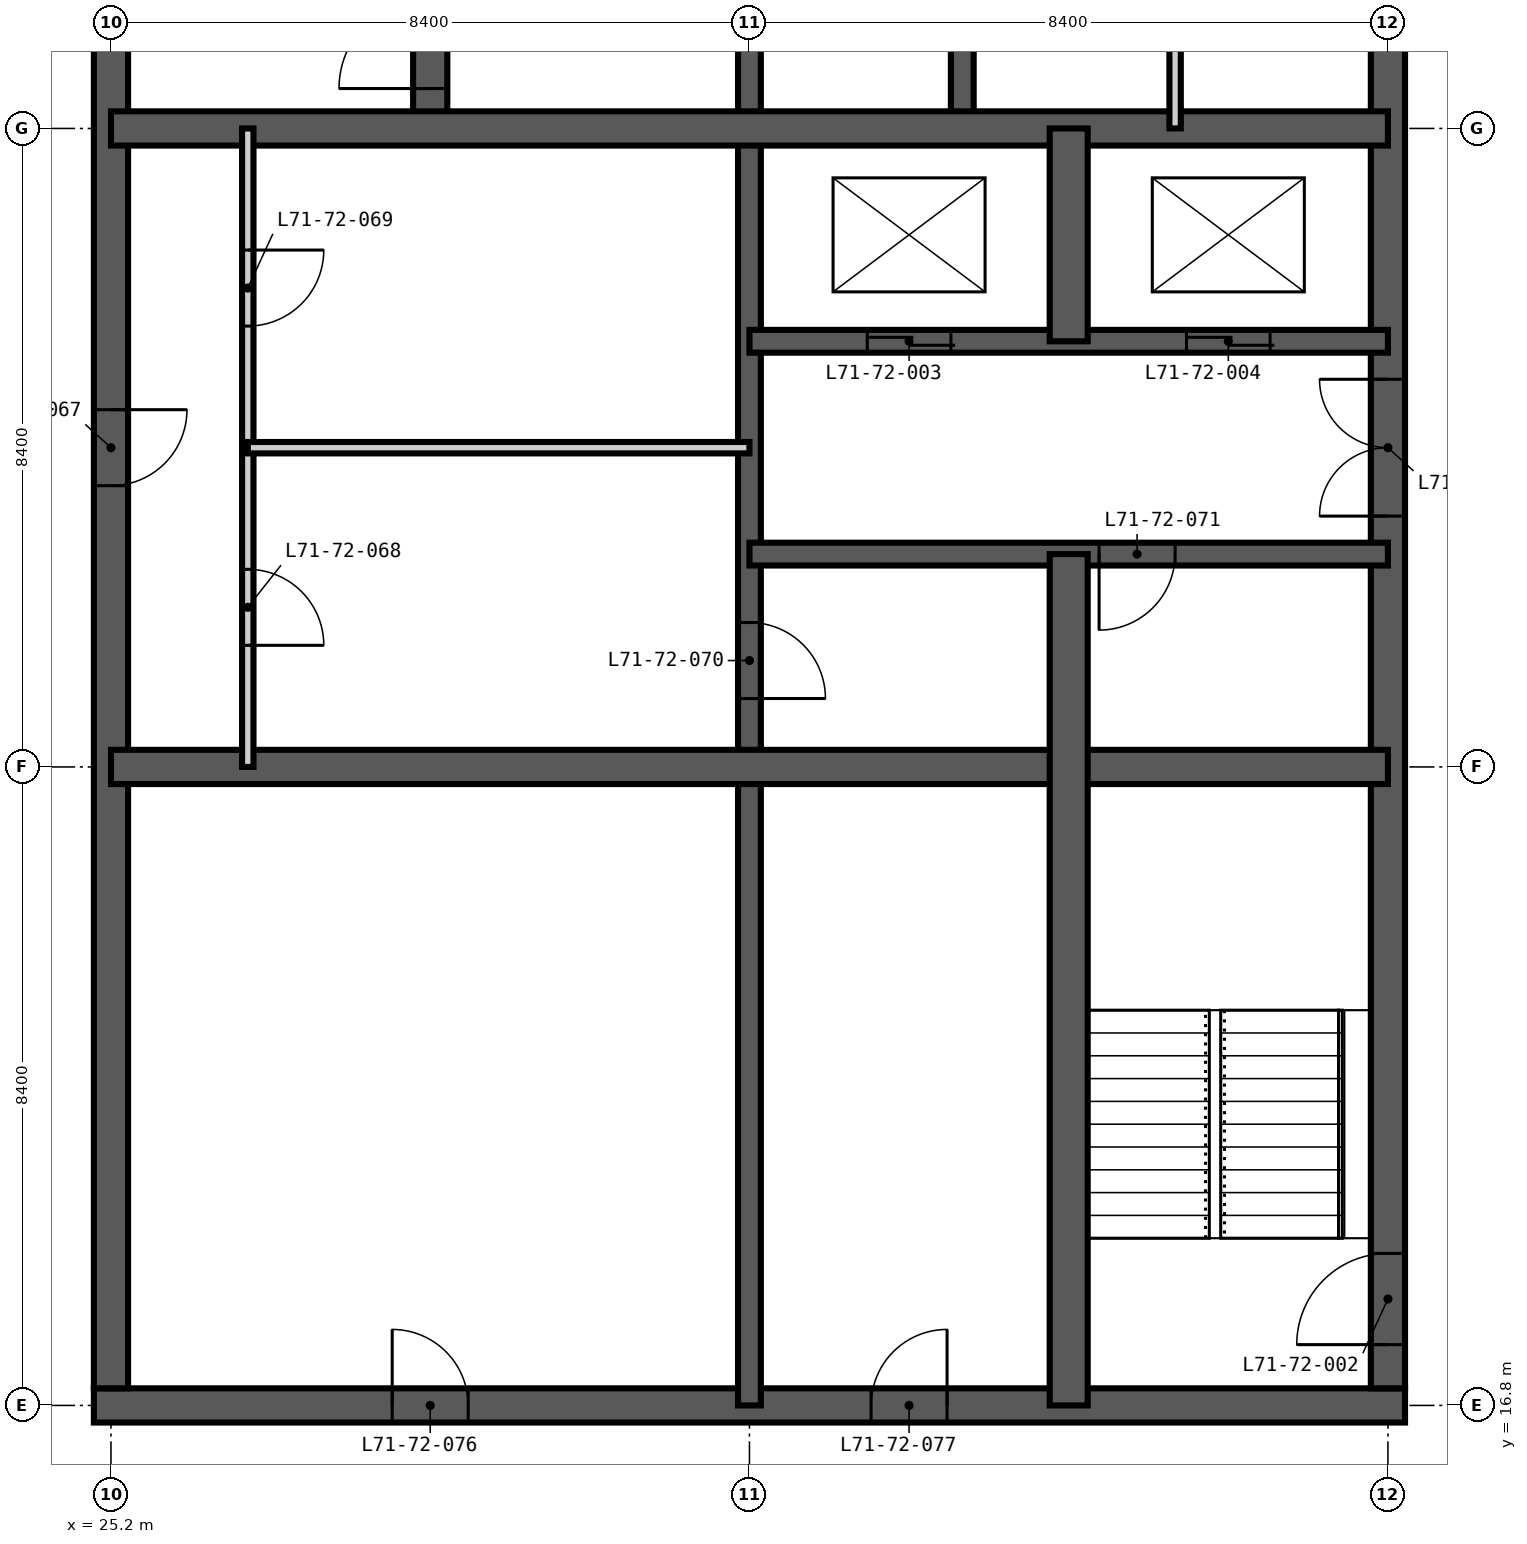
"""IFC4 building model, lengths in metres.
Left out: names, types, materials, properties, quantities, classifications, styles, units other than length and angle.
Written with IfcOpenShell. Run it as: python <this file> out.ifc"""

import sys

from ifc_helpers import new_model, si_unit, direction, frame, frame_2d, origin, place, context, subcontext, project, spatial, rectangle, extrude, element, fill, save


model = new_model("IFC4")
c1 = context("Model", 3, precision=1e-05, world=origin(), true_north=direction((0.0, 1.0)))
c2 = subcontext(c1, "Body", "Model", "MODEL_VIEW")
j1 = project(units=[si_unit("LENGTHUNIT", "METRE"), si_unit("PLANEANGLEUNIT", "RADIAN")], contexts=[c1])
p1 = place(None, origin())
s1 = spatial("IfcSite", under=j1, at=p1, CompositionType="ELEMENT")
p2 = place(p1, origin())
s2 = spatial("IfcBuilding", under=s1, at=p2, CompositionType="ELEMENT")
p3 = place(p2, frame((0.0, 0.0, 276.3)))
s3 = spatial("IfcBuildingStorey", under=s2, at=p3, CompositionType="ELEMENT", Elevation=276.3)
p4 = place(p3, frame((24.975, 16.8, -0.35), z_axis=(0.0, 0.0, 1.0), x_axis=(1.0, 0.0, 0.0)))
e1 = element("IfcWall", 1, at=p4, inside=s3, PredefinedType="SHEAR", context=c2, shape_type="SweptSolid", body=[
    extrude(rectangle(XDim=17.25, YDim=0.45, at=frame_2d((8.625, 0.0))), origin(), (0.0, 0.0, 1.0), 3.9),
])
p5 = place(p4, frame((3.925, 0.0, 0.35)))
e2 = element("IfcOpeningElement", 2, at=p5, cuts=e1, PredefinedType="OPENING", context=c2, shape_type="SweptSolid", body=[
    extrude(rectangle(XDim=1.0, YDim=2.1, at=frame_2d((0.5, 1.05))), frame((0.0, 0.235, 0.0), z_axis=(0.0, -1.0, 0.0), x_axis=(1.0, 0.0, 0.0)), (0.0, 0.0, 1.0), 0.47),
])
p6 = place(p4, frame((10.225, 0.0, 0.35)))
e3 = element("IfcOpeningElement", 3, at=p6, cuts=e1, PredefinedType="OPENING", context=c2, shape_type="SweptSolid", body=[
    extrude(rectangle(XDim=1.0, YDim=2.1, at=frame_2d((0.5, 1.05))), frame((0.0, 0.235, 0.0), z_axis=(0.0, -1.0, 0.0), x_axis=(1.0, 0.0, 0.0)), (0.0, 0.0, 1.0), 0.47),
])
p7 = place(p3, frame((42.0, 17.025, -0.35), z_axis=(0.0, 0.0, 1.0), x_axis=(0.0, 1.0, 0.0)))
e4 = element("IfcWall", 4, at=p7, inside=s3, PredefinedType="SHEAR", context=c2, shape_type="SweptSolid", body=[
    extrude(rectangle(XDim=24.75, YDim=0.45, at=frame_2d((12.375, 0.0))), origin(), (0.0, 0.0, 1.0), 3.9),
])
p8 = place(p7, frame((0.575, 0.0, 0.35)))
e5 = element("IfcOpeningElement", 5, at=p8, cuts=e4, PredefinedType="OPENING", context=c2, shape_type="SweptSolid", body=[
    extrude(rectangle(XDim=1.2, YDim=2.2, at=frame_2d((0.6, 1.1))), frame((0.0, 0.235, 0.0), z_axis=(0.0, -1.0, 0.0), x_axis=(1.0, 0.0, 0.0)), (0.0, 0.0, 1.0), 0.47),
])
p9 = place(p7, frame((11.475, 0.0, 0.35)))
e6 = element("IfcOpeningElement", 6, at=p9, cuts=e4, PredefinedType="OPENING", context=c2, shape_type="SweptSolid", body=[
    extrude(rectangle(XDim=1.8, YDim=2.2, at=frame_2d((0.9, 1.1))), frame((0.0, 0.235, 0.0), z_axis=(0.0, -1.0, 0.0), x_axis=(1.0, 0.0, 0.0)), (0.0, 0.0, 1.0), 0.47),
])
p10 = place(p7, frame((20.275, 0.0, 0.35)))
e7 = element("IfcOpeningElement", 7, at=p10, cuts=e4, PredefinedType="OPENING", context=c2, shape_type="SweptSolid", body=[
    extrude(rectangle(XDim=1.0, YDim=2.1, at=frame_2d((0.5, 1.05))), frame((0.0, 0.235, 0.0), z_axis=(0.0, -1.0, 0.0), x_axis=(1.0, 0.0, 0.0)), (0.0, 0.0, 1.0), 0.47),
])
p11 = place(p3, frame((25.2, 41.775, -0.35), z_axis=(0.0, 0.0, 1.0), x_axis=(0.0, -1.0, 0.0)))
e8 = element("IfcWall", 8, at=p11, inside=s3, PredefinedType="SHEAR", context=c2, shape_type="SweptSolid", body=[
    extrude(rectangle(XDim=24.75, YDim=0.45, at=frame_2d((12.375, 0.0))), origin(), (0.0, 0.0, 1.0), 3.9),
])
p12 = place(p11, frame((11.875, 0.0, 0.35)))
e9 = element("IfcOpeningElement", 9, at=p12, cuts=e8, PredefinedType="OPENING", context=c2, shape_type="SweptSolid", body=[
    extrude(rectangle(XDim=1.0, YDim=2.1, at=frame_2d((0.5, 1.05))), frame((0.0, 0.235, 0.0), z_axis=(0.0, -1.0, 0.0), x_axis=(1.0, 0.0, 0.0)), (0.0, 0.0, 1.0), 0.47),
])
p13 = place(p3, frame((33.6, 16.8, -0.35), z_axis=(0.0, 0.0, 1.0), x_axis=(0.0, 1.0, 0.0)))
e10 = element("IfcWall", 10, at=p13, inside=s3, PredefinedType="SHEAR", context=c2, shape_type="SweptSolid", body=[
    extrude(rectangle(XDim=25.2, YDim=0.3, at=frame_2d((12.6, 0.0))), origin(), (0.0, 0.0, 1.0), 3.9),
])
p14 = place(p13, frame((22.5, 0.0, 0.35)))
e11 = element("IfcOpeningElement", 11, at=p14, cuts=e10, PredefinedType="OPENING", context=c2, shape_type="SweptSolid", body=[
    extrude(rectangle(XDim=1.2, YDim=2.2, at=frame_2d((0.6, 1.1))), frame((0.0, 0.16, 0.0), z_axis=(0.0, -1.0, 0.0), x_axis=(1.0, 0.0, 0.0)), (0.0, 0.0, 1.0), 0.32),
])
p15 = place(p13, frame((18.3, 0.0, 0.35)))
e12 = element("IfcOpeningElement", 12, at=p15, cuts=e10, PredefinedType="OPENING", context=c2, shape_type="SweptSolid", body=[
    extrude(rectangle(XDim=1.2, YDim=2.2, at=frame_2d((0.6, 1.1))), frame((0.0, 0.16, 0.0), z_axis=(0.0, -1.0, 0.0), x_axis=(1.0, 0.0, 0.0)), (0.0, 0.0, 1.0), 0.32),
])
p16 = place(p13, frame((9.3, 0.0, 0.35)))
e13 = element("IfcOpeningElement", 13, at=p16, cuts=e10, PredefinedType="OPENING", context=c2, shape_type="SweptSolid", body=[
    extrude(rectangle(XDim=1.0, YDim=2.1, at=frame_2d((0.5, 1.05))), frame((0.0, 0.16, 0.0), z_axis=(0.0, -1.0, 0.0), x_axis=(1.0, 0.0, 0.0)), (0.0, 0.0, 1.0), 0.32),
])
p17 = place(p3, frame((36.4, 33.6, -0.35), z_axis=(0.0, 0.0, 1.0), x_axis=(0.0, 1.0, 0.0)))
e14 = element("IfcWall", 14, at=p17, inside=s3, PredefinedType="SHEAR", context=c2, shape_type="SweptSolid", body=[
    extrude(rectangle(XDim=8.4, YDim=0.3, at=frame_2d((4.2, 0.0))), origin(), (0.0, 0.0, 1.0), 3.9),
])
p18 = place(p3, frame((33.6, 28.0, -0.35), z_axis=(0.0, 0.0, 1.0), x_axis=(1.0, 0.0, 0.0)))
e15 = element("IfcWall", 15, at=p18, inside=s3, PredefinedType="SHEAR", context=c2, shape_type="SweptSolid", body=[
    extrude(rectangle(XDim=8.4, YDim=0.3, at=frame_2d((4.2, 0.0))), origin(), (0.0, 0.0, 1.0), 3.9),
])
p19 = place(p18, frame((4.6, 0.0, 0.35)))
e16 = element("IfcOpeningElement", 16, at=p19, cuts=e15, PredefinedType="OPENING", context=c2, shape_type="SweptSolid", body=[
    extrude(rectangle(XDim=1.0, YDim=2.1, at=frame_2d((0.5, 1.05))), frame((0.0, 0.16, 0.0), z_axis=(0.0, -1.0, 0.0), x_axis=(1.0, 0.0, 0.0)), (0.0, 0.0, 1.0), 0.32),
])
p20 = place(p3, frame((33.6, 30.8, -0.35), z_axis=(0.0, 0.0, 1.0), x_axis=(1.0, 0.0, 0.0)))
e17 = element("IfcWall", 17, at=p20, inside=s3, PredefinedType="SHEAR", context=c2, shape_type="SweptSolid", body=[
    extrude(rectangle(XDim=8.4, YDim=0.3, at=frame_2d((4.2, 0.0))), origin(), (0.0, 0.0, 1.0), 3.9),
])
p21 = place(p20, frame((1.55, 0.0, 0.35)))
e18 = element("IfcOpeningElement", 18, at=p21, cuts=e17, PredefinedType="OPENING", context=c2, shape_type="SweptSolid", body=[
    extrude(rectangle(XDim=1.1, YDim=2.2, at=frame_2d((0.55, 1.1))), frame((0.0, 0.16, 0.0), z_axis=(0.0, -1.0, 0.0), x_axis=(1.0, 0.0, 0.0)), (0.0, 0.0, 1.0), 0.32),
])
p22 = place(p20, frame((5.75, 0.0, 0.35)))
e19 = element("IfcOpeningElement", 19, at=p22, cuts=e17, PredefinedType="OPENING", context=c2, shape_type="SweptSolid", body=[
    extrude(rectangle(XDim=1.1, YDim=2.2, at=frame_2d((0.55, 1.1))), frame((0.0, 0.16, 0.0), z_axis=(0.0, -1.0, 0.0), x_axis=(1.0, 0.0, 0.0)), (0.0, 0.0, 1.0), 0.32),
])
p23 = place(p3, frame((29.4, 33.6, -0.35), z_axis=(0.0, 0.0, 1.0), x_axis=(0.0, 1.0, 0.0)))
e20 = element("IfcWall", 20, at=p23, inside=s3, PredefinedType="SHEAR", context=c2, shape_type="SweptSolid", body=[
    extrude(rectangle(XDim=8.4, YDim=0.45, at=frame_2d((4.2, 0.0))), origin(), (0.0, 0.0, 1.0), 3.9),
])
p24 = place(p23, frame((0.525, 0.0, 0.35)))
e21 = element("IfcOpeningElement", 21, at=p24, cuts=e20, PredefinedType="OPENING", context=c2, shape_type="SweptSolid", body=[
    extrude(rectangle(XDim=1.2, YDim=2.2, at=frame_2d((0.6, 1.1))), frame((0.0, 0.235, 0.0), z_axis=(0.0, -1.0, 0.0), x_axis=(1.0, 0.0, 0.0)), (0.0, 0.0, 1.0), 0.47),
])
for number, where, z_axis, x_axis in (
    (22, (25.2, 25.2, -0.35), (0.0, 0.0, 1.0), (1.0, 0.0, 0.0)),
    (23, (25.2, 33.6, -0.35), (0.0, 0.0, 1.0), (1.0, 0.0, 0.0)),
):
    element("IfcWall", number, at=place(p3, frame(where, z_axis=z_axis, x_axis=x_axis)), inside=s3, PredefinedType="SHEAR", context=c2, shape_type="SweptSolid", body=[
        extrude(rectangle(XDim=16.8, YDim=0.45, at=frame_2d((8.4, 0.0))), origin(), (0.0, 0.0, 1.0), 3.9),
    ])
p25 = place(p3, frame((37.8, 16.8, -0.35), z_axis=(0.0, 0.0, 1.0), x_axis=(0.0, 1.0, 0.0)))
e24 = element("IfcWall", 24, at=p25, inside=s3, PredefinedType="SHEAR", context=c2, shape_type="SweptSolid", body=[
    extrude(rectangle(XDim=11.2, YDim=0.5, at=frame_2d((5.6, 0.0))), origin(), (0.0, 0.0, 1.0), 3.9),
])
p26 = place(p3, frame((37.8, 30.8, -0.35), z_axis=(0.0, 0.0, 1.0), x_axis=(0.0, 1.0, 0.0)))
e25 = element("IfcWall", 25, at=p26, inside=s3, PredefinedType="SHEAR", context=c2, shape_type="SweptSolid", body=[
    extrude(rectangle(XDim=2.8, YDim=0.5, at=frame_2d((1.4, 0.0))), origin(), (0.0, 0.0, 1.0), 3.9),
])
p27 = place(p3, frame((27.0, 25.2, 0.0), z_axis=(0.0, 0.0, 1.0), x_axis=(0.0, 1.0, 0.0)))
e26 = element("IfcWall", 26, at=p27, inside=s3, PredefinedType="PARTITIONING", context=c2, shape_type="SweptSolid", body=[
    extrude(rectangle(XDim=8.4, YDim=0.15, at=frame_2d((4.2, 0.0))), origin(), (0.0, 0.0, 1.0), 3.55),
])
p28 = place(p27, frame((1.6, 0.0, 0.0)))
e27 = element("IfcOpeningElement", 27, at=p28, cuts=e26, PredefinedType="OPENING", context=c2, shape_type="SweptSolid", body=[
    extrude(rectangle(XDim=1.0, YDim=2.1, at=frame_2d((0.5, 1.05))), frame((0.0, 0.085, 0.0), z_axis=(0.0, -1.0, 0.0), x_axis=(1.0, 0.0, 0.0)), (0.0, 0.0, 1.0), 0.17),
])
p29 = place(p27, frame((5.8, 0.0, 0.0)))
e28 = element("IfcOpeningElement", 28, at=p29, cuts=e26, PredefinedType="OPENING", context=c2, shape_type="SweptSolid", body=[
    extrude(rectangle(XDim=1.0, YDim=2.1, at=frame_2d((0.5, 1.05))), frame((0.0, 0.085, 0.0), z_axis=(0.0, -1.0, 0.0), x_axis=(1.0, 0.0, 0.0)), (0.0, 0.0, 1.0), 0.17),
])
p30 = place(p3, frame((39.2, 33.6, 0.0), z_axis=(0.0, 0.0, 1.0), x_axis=(0.0, 1.0, 0.0)))
e29 = element("IfcWall", 29, at=p30, inside=s3, PredefinedType="PARTITIONING", context=c2, shape_type="SweptSolid", body=[
    extrude(rectangle(XDim=8.4, YDim=0.15, at=frame_2d((4.2, 0.0))), origin(), (0.0, 0.0, 1.0), 3.55),
])
p31 = place(p30, frame((3.7, 0.0, 0.0)))
e30 = element("IfcOpeningElement", 30, at=p31, cuts=e29, PredefinedType="OPENING", context=c2, shape_type="SweptSolid", body=[
    extrude(rectangle(XDim=1.0, YDim=2.1, at=frame_2d((0.5, 1.05))), frame((0.0, 0.085, 0.0), z_axis=(0.0, -1.0, 0.0), x_axis=(1.0, 0.0, 0.0)), (0.0, 0.0, 1.0), 0.17),
])
p32 = place(p3, frame((27.0, 29.4, 0.0), z_axis=(0.0, 0.0, 1.0), x_axis=(1.0, 0.0, 0.0)))
e31 = element("IfcWall", 31, at=p32, inside=s3, PredefinedType="PARTITIONING", context=c2, shape_type="SweptSolid", body=[
    extrude(rectangle(XDim=6.6, YDim=0.15, at=frame_2d((3.3, 0.0))), origin(), (0.0, 0.0, 1.0), 3.55),
])
p33 = place(p24, origin())
e32 = element("IfcDoor", 32, at=p33, inside=s3, OperationType="SINGLE_SWING_LEFT", PredefinedType="DOOR", context=c2, shape_type="SweptSolid", body=[
    extrude(rectangle(XDim=1.2, YDim=2.2, at=frame_2d((0.6, 1.1))), frame((0.0, 0.025, 0.0), z_axis=(0.0, -1.0, 0.0), x_axis=(1.0, 0.0, 0.0)), (0.0, 0.0, 1.0), 0.05),
])
fill(e21, e32)
p34 = place(p8, origin())
e33 = element("IfcDoor", 33, at=p34, inside=s3, OperationType="SINGLE_SWING_LEFT", PredefinedType="DOOR", context=c2, shape_type="SweptSolid", body=[
    extrude(rectangle(XDim=1.2, YDim=2.2, at=frame_2d((0.6, 1.1))), frame((0.0, 0.025, 0.0), z_axis=(0.0, -1.0, 0.0), x_axis=(1.0, 0.0, 0.0)), (0.0, 0.0, 1.0), 0.05),
])
fill(e5, e33)
p35 = place(p21, origin())
e34 = element("IfcDoor", 34, at=p35, inside=s3, OperationType="DOUBLE_DOOR_SLIDING", PredefinedType="DOOR", context=c2, shape_type="SweptSolid", body=[
    extrude(rectangle(XDim=1.1, YDim=2.2, at=frame_2d((0.55, 1.1))), frame((0.0, 0.025, 0.0), z_axis=(0.0, -1.0, 0.0), x_axis=(1.0, 0.0, 0.0)), (0.0, 0.0, 1.0), 0.05),
])
fill(e18, e34)
p36 = place(p22, origin())
e35 = element("IfcDoor", 35, at=p36, inside=s3, OperationType="DOUBLE_DOOR_SLIDING", PredefinedType="DOOR", context=c2, shape_type="SweptSolid", body=[
    extrude(rectangle(XDim=1.1, YDim=2.2, at=frame_2d((0.55, 1.1))), frame((0.0, 0.025, 0.0), z_axis=(0.0, -1.0, 0.0), x_axis=(1.0, 0.0, 0.0)), (0.0, 0.0, 1.0), 0.05),
])
fill(e19, e35)
p37 = place(p12, origin())
e36 = element("IfcDoor", 36, at=p37, inside=s3, OperationType="SINGLE_SWING_LEFT", PredefinedType="DOOR", context=c2, shape_type="SweptSolid", body=[
    extrude(rectangle(XDim=1.0, YDim=2.1, at=frame_2d((0.5, 1.05))), frame((0.0, 0.025, 0.0), z_axis=(0.0, -1.0, 0.0), x_axis=(1.0, 0.0, 0.0)), (0.0, 0.0, 1.0), 0.05),
])
fill(e9, e36)
p38 = place(p28, frame((1.0, 0.0, 0.0), z_axis=(0.0, 0.0, 1.0), x_axis=(-1.0, 0.0, 0.0)))
e37 = element("IfcDoor", 37, at=p38, inside=s3, OperationType="SINGLE_SWING_RIGHT", PredefinedType="DOOR", context=c2, shape_type="SweptSolid", body=[
    extrude(rectangle(XDim=1.0, YDim=2.1, at=frame_2d((0.5, 1.05))), frame((0.0, 0.025, 0.0), z_axis=(0.0, -1.0, 0.0), x_axis=(1.0, 0.0, 0.0)), (0.0, 0.0, 1.0), 0.05),
])
fill(e27, e37)
p39 = place(p29, frame((1.0, 0.0, 0.0), z_axis=(0.0, 0.0, 1.0), x_axis=(-1.0, 0.0, 0.0)))
e38 = element("IfcDoor", 38, at=p39, inside=s3, OperationType="SINGLE_SWING_LEFT", PredefinedType="DOOR", context=c2, shape_type="SweptSolid", body=[
    extrude(rectangle(XDim=1.0, YDim=2.1, at=frame_2d((0.5, 1.05))), frame((0.0, 0.025, 0.0), z_axis=(0.0, -1.0, 0.0), x_axis=(1.0, 0.0, 0.0)), (0.0, 0.0, 1.0), 0.05),
])
fill(e28, e38)
p40 = place(p16, frame((1.0, 0.0, 0.0), z_axis=(0.0, 0.0, 1.0), x_axis=(-1.0, 0.0, 0.0)))
e39 = element("IfcDoor", 39, at=p40, inside=s3, OperationType="SINGLE_SWING_RIGHT", PredefinedType="DOOR", context=c2, shape_type="SweptSolid", body=[
    extrude(rectangle(XDim=1.0, YDim=2.1, at=frame_2d((0.5, 1.05))), frame((0.0, 0.025, 0.0), z_axis=(0.0, -1.0, 0.0), x_axis=(1.0, 0.0, 0.0)), (0.0, 0.0, 1.0), 0.05),
])
fill(e13, e39)
p41 = place(p19, frame((1.0, 0.0, 0.0), z_axis=(0.0, 0.0, 1.0), x_axis=(-1.0, 0.0, 0.0)))
e40 = element("IfcDoor", 40, at=p41, inside=s3, OperationType="SINGLE_SWING_RIGHT", PredefinedType="DOOR", context=c2, shape_type="SweptSolid", body=[
    extrude(rectangle(XDim=1.0, YDim=2.1, at=frame_2d((0.5, 1.05))), frame((0.0, 0.025, 0.0), z_axis=(0.0, -1.0, 0.0), x_axis=(1.0, 0.0, 0.0)), (0.0, 0.0, 1.0), 0.05),
])
fill(e16, e40)
p42 = place(p9, origin())
e41 = element("IfcDoor", 41, at=p42, inside=s3, OperationType="DOUBLE_DOOR_DOUBLE_SWING", PredefinedType="DOOR", context=c2, shape_type="SweptSolid", body=[
    extrude(rectangle(XDim=1.8, YDim=2.2, at=frame_2d((0.9, 1.1))), frame((0.0, 0.025, 0.0), z_axis=(0.0, -1.0, 0.0), x_axis=(1.0, 0.0, 0.0)), (0.0, 0.0, 1.0), 0.05),
])
fill(e6, e41)
p43 = place(p5, origin())
e42 = element("IfcDoor", 42, at=p43, inside=s3, OperationType="SINGLE_SWING_LEFT", PredefinedType="DOOR", context=c2, shape_type="SweptSolid", body=[
    extrude(rectangle(XDim=1.0, YDim=2.1, at=frame_2d((0.5, 1.05))), frame((0.0, 0.025, 0.0), z_axis=(0.0, -1.0, 0.0), x_axis=(1.0, 0.0, 0.0)), (0.0, 0.0, 1.0), 0.05),
])
fill(e2, e42)
p44 = place(p6, origin())
e43 = element("IfcDoor", 43, at=p44, inside=s3, OperationType="SINGLE_SWING_RIGHT", PredefinedType="DOOR", context=c2, shape_type="SweptSolid", body=[
    extrude(rectangle(XDim=1.0, YDim=2.1, at=frame_2d((0.5, 1.05))), frame((0.0, 0.025, 0.0), z_axis=(0.0, -1.0, 0.0), x_axis=(1.0, 0.0, 0.0)), (0.0, 0.0, 1.0), 0.05),
])
fill(e3, e43)
save(model, sys.argv[1])
